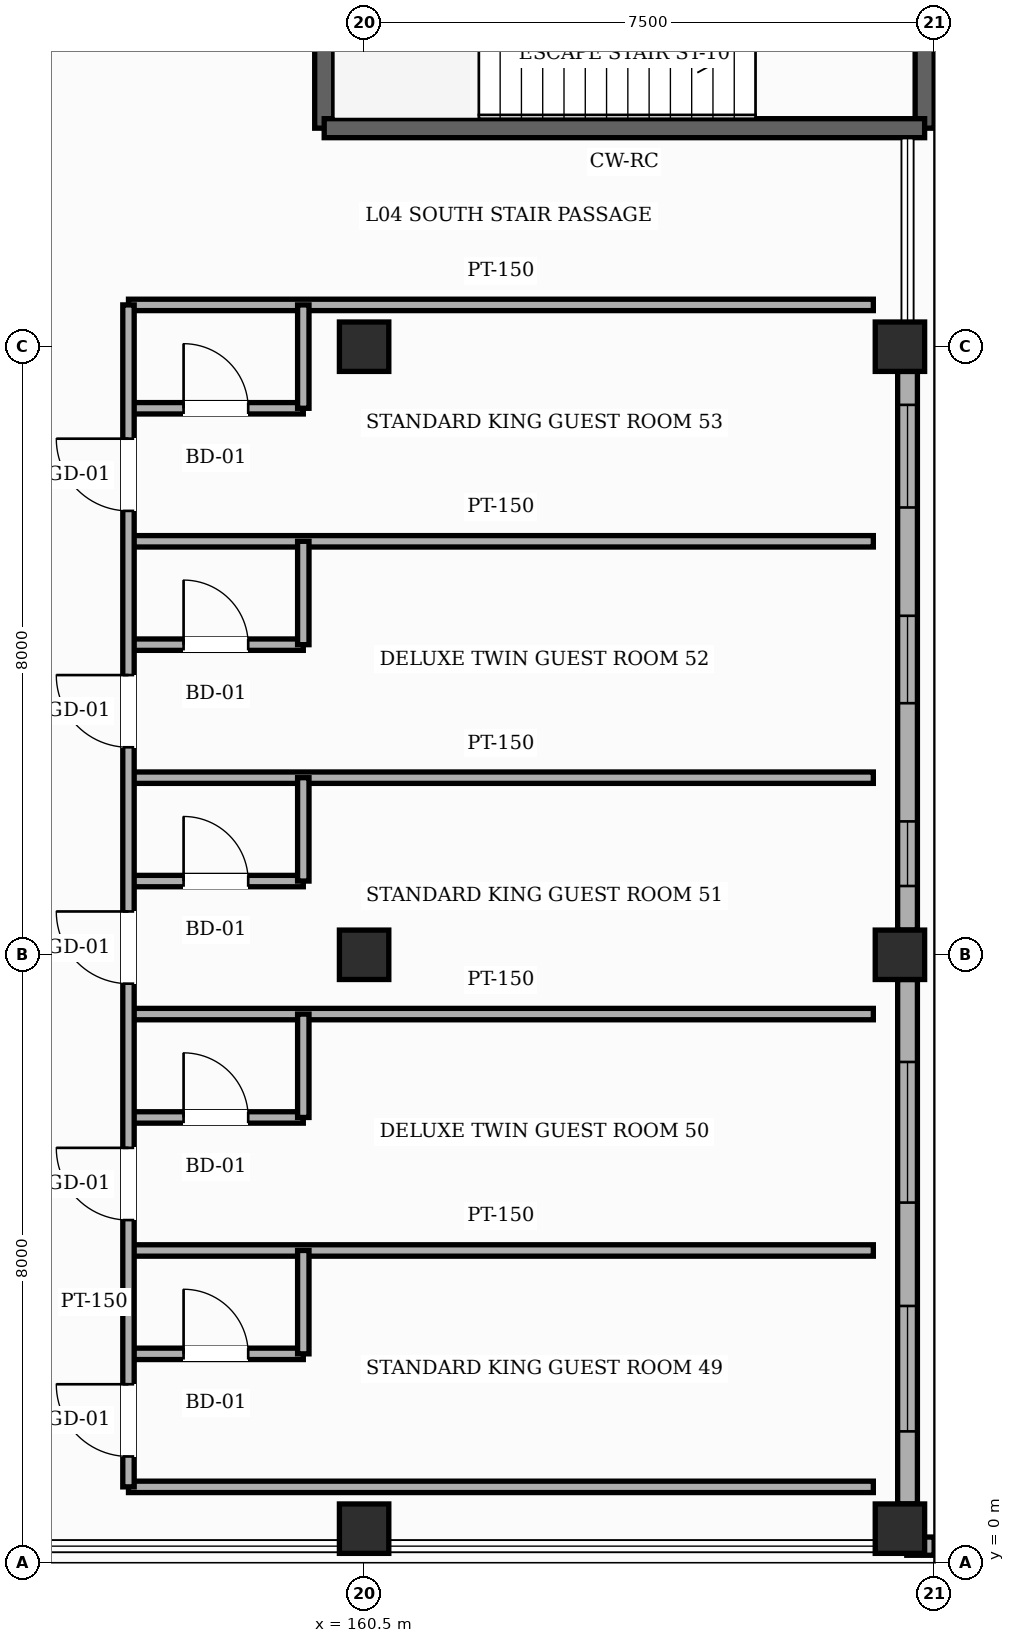
"""IFC4 building model, lengths in metres.
Left out: names, types, materials, properties, quantities, classifications, styles, units other than length and angle.
Written with IfcOpenShell. Run it as: python <this file> out.ifc"""

import sys

from ifc_helpers import new_model, si_unit, direction, frame, frame_2d, origin, origin_2d, place, context, subcontext, project, spatial, rectangle, hollow_rectangle, extrude, element, fill, save


model = new_model("IFC4")
c1 = context("Model", 3, precision=1e-05, world=origin(), true_north=direction((0.0, 1.0)))
c2 = subcontext(c1, "Body", "Model", "MODEL_VIEW")
j1 = project(units=[si_unit("LENGTHUNIT", "METRE"), si_unit("PLANEANGLEUNIT", "RADIAN")], contexts=[c1])
p1 = place(None, origin())
s1 = spatial("IfcSite", under=j1, at=p1, CompositionType="ELEMENT")
p2 = place(p1, origin())
s2 = spatial("IfcBuilding", under=s1, at=p2, CompositionType="ELEMENT")
p3 = place(p2, frame((0.0, 0.0, 19.8)))
s3 = spatial("IfcBuildingStorey", under=s2, at=p3, CompositionType="ELEMENT", Elevation=19.8)
for number, where, z_axis, x_axis in (
    (1, (160.5, 0.45, 0.0), (0.0, 0.0, 1.0), (1.0, 0.0, 0.0)),
    (2, (160.5, 8.0, 0.0), (0.0, 0.0, 1.0), (1.0, 0.0, 0.0)),
    (3, (160.5, 16.0, 0.0), (0.0, 0.0, 1.0), (1.0, 0.0, 0.0)),
    (4, (167.55, 0.45, 0.0), (0.0, 0.0, 1.0), (1.0, 0.0, 0.0)),
    (5, (167.55, 8.0, 0.0), (0.0, 0.0, 1.0), (1.0, 0.0, 0.0)),
    (6, (167.55, 16.0, 0.0), (0.0, 0.0, 1.0), (1.0, 0.0, 0.0)),
):
    element("IfcColumn", number, at=place(p3, frame(where, z_axis=z_axis, x_axis=x_axis)), inside=s3, PredefinedType="COLUMN", context=c2, shape_type="SweptSolid", body=[
        extrude(hollow_rectangle(XDim=0.65, YDim=0.65, WallThickness=0.025, InnerFilletRadius=0.025, OuterFilletRadius=0.05, at=origin_2d()), origin(), (0.0, 0.0, 1.0), 4.8),
    ])
p4 = place(p3, frame((167.65, 7.675, 0.0), z_axis=(0.0, 0.0, 1.0), x_axis=(0.0, -1.0, 0.0)))
e7 = element("IfcWall", 7, at=p4, inside=s3, PredefinedType="SOLIDWALL", context=c2, shape_type="SweptSolid", body=[
    extrude(rectangle(XDim=6.9, YDim=0.26, at=frame_2d((3.45, 0.0))), origin(), (0.0, 0.0, 1.0), 3.905),
])
p5 = place(p4, frame((4.295, 0.0, 0.85)))
e8 = element("IfcOpeningElement", 8, at=p5, cuts=e7, PredefinedType="OPENING", context=c2, shape_type="SweptSolid", body=[
    extrude(rectangle(XDim=1.65, YDim=1.65, at=frame_2d((0.825, 0.825))), frame((0.0, 0.14, 0.0), z_axis=(0.0, -1.0, 0.0), x_axis=(1.0, 0.0, 0.0)), (0.0, 0.0, 1.0), 0.28),
])
p6 = place(p4, frame((1.085, 0.0, 0.85)))
e9 = element("IfcOpeningElement", 9, at=p6, cuts=e7, PredefinedType="OPENING", context=c2, shape_type="SweptSolid", body=[
    extrude(rectangle(XDim=1.85, YDim=1.65, at=frame_2d((0.925, 0.825))), frame((0.0, 0.14, 0.0), z_axis=(0.0, -1.0, 0.0), x_axis=(1.0, 0.0, 0.0)), (0.0, 0.0, 1.0), 0.28),
])
p7 = place(p3, frame((167.65, 15.675, 0.0), z_axis=(0.0, 0.0, 1.0), x_axis=(0.0, -1.0, 0.0)))
e10 = element("IfcWall", 10, at=p7, inside=s3, PredefinedType="SOLIDWALL", context=c2, shape_type="SweptSolid", body=[
    extrude(rectangle(XDim=7.35, YDim=0.26, at=frame_2d((3.675, 0.0))), origin(), (0.0, 0.0, 1.0), 3.905),
])
p8 = place(p7, frame((5.92, 0.0, 0.85)))
e11 = element("IfcOpeningElement", 11, at=p8, cuts=e10, PredefinedType="OPENING", context=c2, shape_type="SweptSolid", body=[
    extrude(rectangle(XDim=0.85, YDim=1.35, at=frame_2d((0.425, 0.675))), frame((0.0, 0.14, 0.0), z_axis=(0.0, -1.0, 0.0), x_axis=(1.0, 0.0, 0.0)), (0.0, 0.0, 1.0), 0.28),
])
p9 = place(p7, frame((3.215, 0.0, 0.85)))
e12 = element("IfcOpeningElement", 12, at=p9, cuts=e10, PredefinedType="OPENING", context=c2, shape_type="SweptSolid", body=[
    extrude(rectangle(XDim=1.15, YDim=1.8, at=frame_2d((0.575, 0.9))), frame((0.0, 0.14, 0.0), z_axis=(0.0, -1.0, 0.0), x_axis=(1.0, 0.0, 0.0)), (0.0, 0.0, 1.0), 0.28),
])
p10 = place(p7, frame((0.44, 0.0, 0.85)))
e13 = element("IfcOpeningElement", 13, at=p10, cuts=e10, PredefinedType="OPENING", context=c2, shape_type="SweptSolid", body=[
    extrude(rectangle(XDim=1.35, YDim=1.8, at=frame_2d((0.675, 0.9))), frame((0.0, 0.14, 0.0), z_axis=(0.0, -1.0, 0.0), x_axis=(1.0, 0.0, 0.0)), (0.0, 0.0, 1.0), 0.28),
])
p11 = place(p3, frame((168.0, 0.22, 0.0), z_axis=(0.0, 0.0, 1.0), x_axis=(-1.0, 0.0, 0.0)))
e14 = element("IfcWall", 14, at=p11, inside=s3, PredefinedType="SOLIDWALL", context=c2, shape_type="SweptSolid", body=[
    extrude(rectangle(XDim=0.36, YDim=0.24, at=frame_2d((0.18, 0.0))), origin(), (0.0, 0.0, 1.0), 4.565),
])
for number, where, z_axis, x_axis in (
    (15, (167.875, 22.225, 0.0), (0.0, 0.0, 1.0), (0.0, -1.0, 0.0)),
    (16, (159.975, 18.875, 0.0), (0.0, 0.0, 1.0), (0.0, 1.0, 0.0)),
):
    element("IfcWall", number, at=place(p3, frame(where, z_axis=z_axis, x_axis=x_axis)), inside=s3, PredefinedType="SHEAR", context=c2, shape_type="SweptSolid", body=[
        extrude(rectangle(XDim=3.35, YDim=0.25, at=frame_2d((1.675, 0.0))), origin(), (0.0, 0.0, 1.0), 4.58),
    ])
p12 = place(p3, frame((167.875, 18.875, 0.0), z_axis=(0.0, 0.0, 1.0), x_axis=(-1.0, 0.0, 0.0)))
e17 = element("IfcWall", 17, at=p12, inside=s3, PredefinedType="SHEAR", context=c2, shape_type="SweptSolid", body=[
    extrude(rectangle(XDim=7.9, YDim=0.25, at=frame_2d((3.95, 0.0))), origin(), (0.0, 0.0, 1.0), 4.58),
])
p13 = place(p3, frame((157.4, 1.0, 0.0), z_axis=(0.0, 0.0, 1.0), x_axis=(1.0, 0.0, 0.0)))
e18 = element("IfcWall", 18, at=p13, inside=s3, PredefinedType="PARTITIONING", context=c2, shape_type="SweptSolid", body=[
    extrude(rectangle(XDim=9.8, YDim=0.15, at=frame_2d((4.9, 0.0))), origin(), (0.0, 0.0, 1.0), 4.565),
])
p14 = place(p3, frame((157.4, 2.75, 0.0), z_axis=(0.0, 0.0, 1.0), x_axis=(1.0, 0.0, 0.0)))
e19 = element("IfcWall", 19, at=p14, inside=s3, PredefinedType="PARTITIONING", context=c2, shape_type="SweptSolid", body=[
    extrude(rectangle(XDim=2.3, YDim=0.15, at=frame_2d((1.15, 0.0))), origin(), (0.0, 0.0, 1.0), 4.565),
])
p15 = place(p14, frame((0.725, 0.0, 0.0)))
e20 = element("IfcOpeningElement", 20, at=p15, cuts=e19, PredefinedType="OPENING", context=c2, shape_type="SweptSolid", body=[
    extrude(rectangle(XDim=0.85, YDim=2.1, at=frame_2d((0.425, 1.05))), frame((0.0, 0.085, 0.0), z_axis=(0.0, -1.0, 0.0), x_axis=(1.0, 0.0, 0.0)), (0.0, 0.0, 1.0), 0.17),
])
p16 = place(p3, frame((157.4, 4.11, 0.0), z_axis=(0.0, 0.0, 1.0), x_axis=(1.0, 0.0, 0.0)))
e21 = element("IfcWall", 21, at=p16, inside=s3, PredefinedType="PARTITIONING", context=c2, shape_type="SweptSolid", body=[
    extrude(rectangle(XDim=9.8, YDim=0.15, at=frame_2d((4.9, 0.0))), origin(), (0.0, 0.0, 1.0), 4.205),
])
p17 = place(p3, frame((157.4, 5.86, 0.0), z_axis=(0.0, 0.0, 1.0), x_axis=(1.0, 0.0, 0.0)))
e22 = element("IfcWall", 22, at=p17, inside=s3, PredefinedType="PARTITIONING", context=c2, shape_type="SweptSolid", body=[
    extrude(rectangle(XDim=2.3, YDim=0.15, at=frame_2d((1.15, 0.0))), origin(), (0.0, 0.0, 1.0), 4.565),
])
p18 = place(p17, frame((0.725, 0.0, 0.0)))
e23 = element("IfcOpeningElement", 23, at=p18, cuts=e22, PredefinedType="OPENING", context=c2, shape_type="SweptSolid", body=[
    extrude(rectangle(XDim=0.85, YDim=2.1, at=frame_2d((0.425, 1.05))), frame((0.0, 0.085, 0.0), z_axis=(0.0, -1.0, 0.0), x_axis=(1.0, 0.0, 0.0)), (0.0, 0.0, 1.0), 0.17),
])
p19 = place(p3, frame((157.4, 7.22, 0.0), z_axis=(0.0, 0.0, 1.0), x_axis=(1.0, 0.0, 0.0)))
e24 = element("IfcWall", 24, at=p19, inside=s3, PredefinedType="PARTITIONING", context=c2, shape_type="SweptSolid", body=[
    extrude(rectangle(XDim=9.8, YDim=0.15, at=frame_2d((4.9, 0.0))), origin(), (0.0, 0.0, 1.0), 4.565),
])
p20 = place(p3, frame((157.4, 8.97, 0.0), z_axis=(0.0, 0.0, 1.0), x_axis=(1.0, 0.0, 0.0)))
e25 = element("IfcWall", 25, at=p20, inside=s3, PredefinedType="PARTITIONING", context=c2, shape_type="SweptSolid", body=[
    extrude(rectangle(XDim=2.3, YDim=0.15, at=frame_2d((1.15, 0.0))), origin(), (0.0, 0.0, 1.0), 4.565),
])
p21 = place(p20, frame((0.725, 0.0, 0.0)))
e26 = element("IfcOpeningElement", 26, at=p21, cuts=e25, PredefinedType="OPENING", context=c2, shape_type="SweptSolid", body=[
    extrude(rectangle(XDim=0.85, YDim=2.1, at=frame_2d((0.425, 1.05))), frame((0.0, 0.085, 0.0), z_axis=(0.0, -1.0, 0.0), x_axis=(1.0, 0.0, 0.0)), (0.0, 0.0, 1.0), 0.17),
])
p22 = place(p3, frame((157.4, 10.33, 0.0), z_axis=(0.0, 0.0, 1.0), x_axis=(1.0, 0.0, 0.0)))
e27 = element("IfcWall", 27, at=p22, inside=s3, PredefinedType="PARTITIONING", context=c2, shape_type="SweptSolid", body=[
    extrude(rectangle(XDim=9.8, YDim=0.15, at=frame_2d((4.9, 0.0))), origin(), (0.0, 0.0, 1.0), 4.565),
])
p23 = place(p3, frame((157.4, 12.08, 0.0), z_axis=(0.0, 0.0, 1.0), x_axis=(1.0, 0.0, 0.0)))
e28 = element("IfcWall", 28, at=p23, inside=s3, PredefinedType="PARTITIONING", context=c2, shape_type="SweptSolid", body=[
    extrude(rectangle(XDim=2.3, YDim=0.15, at=frame_2d((1.15, 0.0))), origin(), (0.0, 0.0, 1.0), 4.205),
])
p24 = place(p23, frame((0.725, 0.0, 0.0)))
e29 = element("IfcOpeningElement", 29, at=p24, cuts=e28, PredefinedType="OPENING", context=c2, shape_type="SweptSolid", body=[
    extrude(rectangle(XDim=0.85, YDim=2.1, at=frame_2d((0.425, 1.05))), frame((0.0, 0.085, 0.0), z_axis=(0.0, -1.0, 0.0), x_axis=(1.0, 0.0, 0.0)), (0.0, 0.0, 1.0), 0.17),
])
p25 = place(p3, frame((157.4, 13.44, 0.0), z_axis=(0.0, 0.0, 1.0), x_axis=(1.0, 0.0, 0.0)))
e30 = element("IfcWall", 30, at=p25, inside=s3, PredefinedType="PARTITIONING", context=c2, shape_type="SweptSolid", body=[
    extrude(rectangle(XDim=9.8, YDim=0.15, at=frame_2d((4.9, 0.0))), origin(), (0.0, 0.0, 1.0), 4.565),
])
p26 = place(p3, frame((157.4, 15.19, 0.0), z_axis=(0.0, 0.0, 1.0), x_axis=(1.0, 0.0, 0.0)))
e31 = element("IfcWall", 31, at=p26, inside=s3, PredefinedType="PARTITIONING", context=c2, shape_type="SweptSolid", body=[
    extrude(rectangle(XDim=2.3, YDim=0.15, at=frame_2d((1.15, 0.0))), origin(), (0.0, 0.0, 1.0), 4.565),
])
p27 = place(p26, frame((0.725, 0.0, 0.0)))
e32 = element("IfcOpeningElement", 32, at=p27, cuts=e31, PredefinedType="OPENING", context=c2, shape_type="SweptSolid", body=[
    extrude(rectangle(XDim=0.85, YDim=2.1, at=frame_2d((0.425, 1.05))), frame((0.0, 0.085, 0.0), z_axis=(0.0, -1.0, 0.0), x_axis=(1.0, 0.0, 0.0)), (0.0, 0.0, 1.0), 0.17),
])
p28 = place(p3, frame((157.4, 16.55, 0.0), z_axis=(0.0, 0.0, 1.0), x_axis=(1.0, 0.0, 0.0)))
e33 = element("IfcWall", 33, at=p28, inside=s3, PredefinedType="PARTITIONING", context=c2, shape_type="SweptSolid", body=[
    extrude(rectangle(XDim=9.8, YDim=0.15, at=frame_2d((4.9, 0.0))), origin(), (0.0, 0.0, 1.0), 4.565),
])
p29 = place(p3, frame((157.4, 1.0, 0.0), z_axis=(0.0, 0.0, 1.0), x_axis=(0.0, 1.0, 0.0)))
e34 = element("IfcWall", 34, at=p29, inside=s3, PredefinedType="PARTITIONING", context=c2, shape_type="SweptSolid", body=[
    extrude(rectangle(XDim=15.55, YDim=0.15, at=frame_2d((7.775, 0.0))), origin(), (0.0, 0.0, 1.0), 4.565),
])
p30 = place(p29, frame((0.4, 0.0, 0.0)))
e35 = element("IfcOpeningElement", 35, at=p30, cuts=e34, PredefinedType="OPENING", context=c2, shape_type="SweptSolid", body=[
    extrude(rectangle(XDim=0.95, YDim=2.15, at=frame_2d((0.475, 1.075))), frame((0.0, 0.085, 0.0), z_axis=(0.0, -1.0, 0.0), x_axis=(1.0, 0.0, 0.0)), (0.0, 0.0, 1.0), 0.17),
])
p31 = place(p29, frame((3.51, 0.0, 0.0)))
e36 = element("IfcOpeningElement", 36, at=p31, cuts=e34, PredefinedType="OPENING", context=c2, shape_type="SweptSolid", body=[
    extrude(rectangle(XDim=0.95, YDim=2.15, at=frame_2d((0.475, 1.075))), frame((0.0, 0.085, 0.0), z_axis=(0.0, -1.0, 0.0), x_axis=(1.0, 0.0, 0.0)), (0.0, 0.0, 1.0), 0.17),
])
p32 = place(p29, frame((6.62, 0.0, 0.0)))
e37 = element("IfcOpeningElement", 37, at=p32, cuts=e34, PredefinedType="OPENING", context=c2, shape_type="SweptSolid", body=[
    extrude(rectangle(XDim=0.95, YDim=2.15, at=frame_2d((0.475, 1.075))), frame((0.0, 0.085, 0.0), z_axis=(0.0, -1.0, 0.0), x_axis=(1.0, 0.0, 0.0)), (0.0, 0.0, 1.0), 0.17),
])
p33 = place(p29, frame((9.73, 0.0, 0.0)))
e38 = element("IfcOpeningElement", 38, at=p33, cuts=e34, PredefinedType="OPENING", context=c2, shape_type="SweptSolid", body=[
    extrude(rectangle(XDim=0.95, YDim=2.15, at=frame_2d((0.475, 1.075))), frame((0.0, 0.085, 0.0), z_axis=(0.0, -1.0, 0.0), x_axis=(1.0, 0.0, 0.0)), (0.0, 0.0, 1.0), 0.17),
])
p34 = place(p29, frame((12.84, 0.0, 0.0)))
e39 = element("IfcOpeningElement", 39, at=p34, cuts=e34, PredefinedType="OPENING", context=c2, shape_type="SweptSolid", body=[
    extrude(rectangle(XDim=0.95, YDim=2.15, at=frame_2d((0.475, 1.075))), frame((0.0, 0.085, 0.0), z_axis=(0.0, -1.0, 0.0), x_axis=(1.0, 0.0, 0.0)), (0.0, 0.0, 1.0), 0.17),
])
p35 = place(p3, frame((159.7, 2.75, 0.0), z_axis=(0.0, 0.0, 1.0), x_axis=(0.0, 1.0, 0.0)))
e40 = element("IfcWall", 40, at=p35, inside=s3, PredefinedType="PARTITIONING", context=c2, shape_type="SweptSolid", body=[
    extrude(rectangle(XDim=1.36, YDim=0.15, at=frame_2d((0.68, 0.0))), origin(), (0.0, 0.0, 1.0), 4.565),
])
p36 = place(p3, frame((159.7, 5.86, 0.0), z_axis=(0.0, 0.0, 1.0), x_axis=(0.0, 1.0, 0.0)))
e41 = element("IfcWall", 41, at=p36, inside=s3, PredefinedType="PARTITIONING", context=c2, shape_type="SweptSolid", body=[
    extrude(rectangle(XDim=1.36, YDim=0.15, at=frame_2d((0.68, 0.0))), origin(), (0.0, 0.0, 1.0), 4.565),
])
p37 = place(p3, frame((159.7, 8.97, 0.0), z_axis=(0.0, 0.0, 1.0), x_axis=(0.0, 1.0, 0.0)))
e42 = element("IfcWall", 42, at=p37, inside=s3, PredefinedType="PARTITIONING", context=c2, shape_type="SweptSolid", body=[
    extrude(rectangle(XDim=1.36, YDim=0.15, at=frame_2d((0.68, 0.0))), origin(), (0.0, 0.0, 1.0), 4.565),
])
p38 = place(p3, frame((159.7, 12.08, 0.0), z_axis=(0.0, 0.0, 1.0), x_axis=(0.0, 1.0, 0.0)))
e43 = element("IfcWall", 43, at=p38, inside=s3, PredefinedType="PARTITIONING", context=c2, shape_type="SweptSolid", body=[
    extrude(rectangle(XDim=1.36, YDim=0.15, at=frame_2d((0.68, 0.0))), origin(), (0.0, 0.0, 1.0), 4.565),
])
p39 = place(p3, frame((159.7, 15.19, 0.0), z_axis=(0.0, 0.0, 1.0), x_axis=(0.0, 1.0, 0.0)))
e44 = element("IfcWall", 44, at=p39, inside=s3, PredefinedType="PARTITIONING", context=c2, shape_type="SweptSolid", body=[
    extrude(rectangle(XDim=1.36, YDim=0.15, at=frame_2d((0.68, 0.0))), origin(), (0.0, 0.0, 1.0), 4.565),
])
p40 = place(p5, origin())
e45 = element("IfcWindow", 45, at=p40, inside=s3, PartitioningType="SINGLE_PANEL", PredefinedType="WINDOW", context=c2, shape_type="SweptSolid", body=[
    extrude(rectangle(XDim=1.65, YDim=1.65, at=frame_2d((0.825, 0.825))), frame((0.0, 0.03, 0.0), z_axis=(0.0, -1.0, 0.0), x_axis=(1.0, 0.0, 0.0)), (0.0, 0.0, 1.0), 0.06),
])
fill(e8, e45)
p41 = place(p6, origin())
e46 = element("IfcWindow", 46, at=p41, inside=s3, PartitioningType="SINGLE_PANEL", PredefinedType="WINDOW", context=c2, shape_type="SweptSolid", body=[
    extrude(rectangle(XDim=1.85, YDim=1.65, at=frame_2d((0.925, 0.825))), frame((0.0, 0.03, 0.0), z_axis=(0.0, -1.0, 0.0), x_axis=(1.0, 0.0, 0.0)), (0.0, 0.0, 1.0), 0.06),
])
fill(e9, e46)
p42 = place(p8, origin())
e47 = element("IfcWindow", 47, at=p42, inside=s3, PartitioningType="SINGLE_PANEL", PredefinedType="WINDOW", context=c2, shape_type="SweptSolid", body=[
    extrude(rectangle(XDim=0.85, YDim=1.35, at=frame_2d((0.425, 0.675))), frame((0.0, 0.03, 0.0), z_axis=(0.0, -1.0, 0.0), x_axis=(1.0, 0.0, 0.0)), (0.0, 0.0, 1.0), 0.06),
])
fill(e11, e47)
p43 = place(p9, origin())
e48 = element("IfcWindow", 48, at=p43, inside=s3, PartitioningType="SINGLE_PANEL", PredefinedType="WINDOW", context=c2, shape_type="SweptSolid", body=[
    extrude(rectangle(XDim=1.15, YDim=1.8, at=frame_2d((0.575, 0.9))), frame((0.0, 0.03, 0.0), z_axis=(0.0, -1.0, 0.0), x_axis=(1.0, 0.0, 0.0)), (0.0, 0.0, 1.0), 0.06),
])
fill(e12, e48)
p44 = place(p10, origin())
e49 = element("IfcWindow", 49, at=p44, inside=s3, PartitioningType="SINGLE_PANEL", PredefinedType="WINDOW", context=c2, shape_type="SweptSolid", body=[
    extrude(rectangle(XDim=1.35, YDim=1.8, at=frame_2d((0.675, 0.9))), frame((0.0, 0.03, 0.0), z_axis=(0.0, -1.0, 0.0), x_axis=(1.0, 0.0, 0.0)), (0.0, 0.0, 1.0), 0.06),
])
fill(e13, e49)
p45 = place(p30, origin())
e50 = element("IfcDoor", 50, at=p45, inside=s3, OperationType="SINGLE_SWING_RIGHT", PredefinedType="DOOR", context=c2, shape_type="SweptSolid", body=[
    extrude(rectangle(XDim=0.95, YDim=2.15, at=frame_2d((0.475, 1.075))), frame((0.0, 0.025, 0.0), z_axis=(0.0, -1.0, 0.0), x_axis=(1.0, 0.0, 0.0)), (0.0, 0.0, 1.0), 0.05),
])
fill(e35, e50)
p46 = place(p15, origin())
e51 = element("IfcDoor", 51, at=p46, inside=s3, OperationType="SINGLE_SWING_LEFT", PredefinedType="DOOR", context=c2, shape_type="SweptSolid", body=[
    extrude(rectangle(XDim=0.85, YDim=2.1, at=frame_2d((0.425, 1.05))), frame((0.0, 0.025, 0.0), z_axis=(0.0, -1.0, 0.0), x_axis=(1.0, 0.0, 0.0)), (0.0, 0.0, 1.0), 0.05),
])
fill(e20, e51)
p47 = place(p31, origin())
e52 = element("IfcDoor", 52, at=p47, inside=s3, OperationType="SINGLE_SWING_RIGHT", PredefinedType="DOOR", context=c2, shape_type="SweptSolid", body=[
    extrude(rectangle(XDim=0.95, YDim=2.15, at=frame_2d((0.475, 1.075))), frame((0.0, 0.025, 0.0), z_axis=(0.0, -1.0, 0.0), x_axis=(1.0, 0.0, 0.0)), (0.0, 0.0, 1.0), 0.05),
])
fill(e36, e52)
p48 = place(p18, origin())
e53 = element("IfcDoor", 53, at=p48, inside=s3, OperationType="SINGLE_SWING_LEFT", PredefinedType="DOOR", context=c2, shape_type="SweptSolid", body=[
    extrude(rectangle(XDim=0.85, YDim=2.1, at=frame_2d((0.425, 1.05))), frame((0.0, 0.025, 0.0), z_axis=(0.0, -1.0, 0.0), x_axis=(1.0, 0.0, 0.0)), (0.0, 0.0, 1.0), 0.05),
])
fill(e23, e53)
p49 = place(p32, origin())
e54 = element("IfcDoor", 54, at=p49, inside=s3, OperationType="SINGLE_SWING_RIGHT", PredefinedType="DOOR", context=c2, shape_type="SweptSolid", body=[
    extrude(rectangle(XDim=0.95, YDim=2.15, at=frame_2d((0.475, 1.075))), frame((0.0, 0.025, 0.0), z_axis=(0.0, -1.0, 0.0), x_axis=(1.0, 0.0, 0.0)), (0.0, 0.0, 1.0), 0.05),
])
fill(e37, e54)
p50 = place(p21, origin())
e55 = element("IfcDoor", 55, at=p50, inside=s3, OperationType="SINGLE_SWING_LEFT", PredefinedType="DOOR", context=c2, shape_type="SweptSolid", body=[
    extrude(rectangle(XDim=0.85, YDim=2.1, at=frame_2d((0.425, 1.05))), frame((0.0, 0.025, 0.0), z_axis=(0.0, -1.0, 0.0), x_axis=(1.0, 0.0, 0.0)), (0.0, 0.0, 1.0), 0.05),
])
fill(e26, e55)
p51 = place(p33, origin())
e56 = element("IfcDoor", 56, at=p51, inside=s3, OperationType="SINGLE_SWING_RIGHT", PredefinedType="DOOR", context=c2, shape_type="SweptSolid", body=[
    extrude(rectangle(XDim=0.95, YDim=2.15, at=frame_2d((0.475, 1.075))), frame((0.0, 0.025, 0.0), z_axis=(0.0, -1.0, 0.0), x_axis=(1.0, 0.0, 0.0)), (0.0, 0.0, 1.0), 0.05),
])
fill(e38, e56)
p52 = place(p24, origin())
e57 = element("IfcDoor", 57, at=p52, inside=s3, OperationType="SINGLE_SWING_LEFT", PredefinedType="DOOR", context=c2, shape_type="SweptSolid", body=[
    extrude(rectangle(XDim=0.85, YDim=2.1, at=frame_2d((0.425, 1.05))), frame((0.0, 0.025, 0.0), z_axis=(0.0, -1.0, 0.0), x_axis=(1.0, 0.0, 0.0)), (0.0, 0.0, 1.0), 0.05),
])
fill(e29, e57)
p53 = place(p34, origin())
e58 = element("IfcDoor", 58, at=p53, inside=s3, OperationType="SINGLE_SWING_RIGHT", PredefinedType="DOOR", context=c2, shape_type="SweptSolid", body=[
    extrude(rectangle(XDim=0.95, YDim=2.15, at=frame_2d((0.475, 1.075))), frame((0.0, 0.025, 0.0), z_axis=(0.0, -1.0, 0.0), x_axis=(1.0, 0.0, 0.0)), (0.0, 0.0, 1.0), 0.05),
])
fill(e39, e58)
p54 = place(p27, origin())
e59 = element("IfcDoor", 59, at=p54, inside=s3, OperationType="SINGLE_SWING_LEFT", PredefinedType="DOOR", context=c2, shape_type="SweptSolid", body=[
    extrude(rectangle(XDim=0.85, YDim=2.1, at=frame_2d((0.425, 1.05))), frame((0.0, 0.025, 0.0), z_axis=(0.0, -1.0, 0.0), x_axis=(1.0, 0.0, 0.0)), (0.0, 0.0, 1.0), 0.05),
])
fill(e32, e59)
save(model, sys.argv[1])
